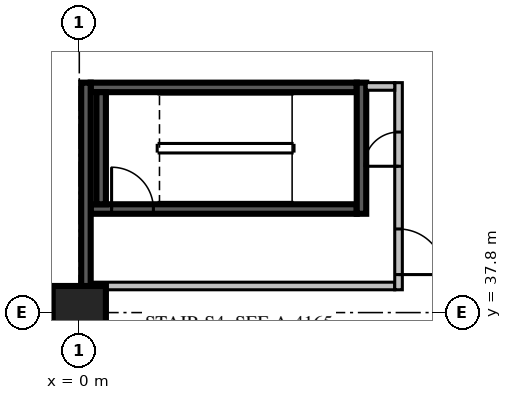
"""IFC4 building model, lengths in metres.
Left out: names, types, materials, properties, quantities, classifications, styles, units other than length and angle.
Written with IfcOpenShell. Run it as: python <this file> out.ifc"""

import sys

from ifc_helpers import new_model, si_unit, direction, frame, frame_2d, origin, origin_2d, place, context, subcontext, project, spatial, rectangle, extrude, source, transform, mapped, element, fill, save


model = new_model("IFC4")
c1 = context("Model", 3, precision=1e-05, world=origin(), true_north=direction((0.0, 1.0)))
c2 = subcontext(c1, "Body", "Model", "MODEL_VIEW")
j1 = project(units=[si_unit("LENGTHUNIT", "METRE"), si_unit("PLANEANGLEUNIT", "RADIAN")], contexts=[c1])
p1 = place(None, origin())
s1 = spatial("IfcSite", under=j1, at=p1, CompositionType="ELEMENT")
p2 = place(p1, origin())
s2 = spatial("IfcBuilding", under=s1, at=p2, CompositionType="ELEMENT")
p3 = place(p2, frame((0.0, 0.0, 7.5)))
s3 = spatial("IfcBuildingStorey", under=s2, at=p3, CompositionType="ELEMENT", Elevation=7.5)
m1 = source(origin(), c2, "Body", "SweptSolid", [
    extrude(rectangle(XDim=1.4, YDim=1.4, at=origin_2d()), origin(), (0.0, 0.0, 1.0), 5.4),
])
p4 = place(p3, frame((0.0, 37.8, 0.0), z_axis=(0.0, 0.0, 1.0), x_axis=(1.0, 0.0, 0.0)))
e1 = element("IfcColumn", 1, at=p4, inside=s3, PredefinedType="COLUMN", context=c2, shape_type="MappedRepresentation", body=[
    mapped(m1, transform((0.0, 0.0, 0.0), scale=1.0)),
])
m2 = source(origin(), c2, "Body", "SweptSolid", [
    extrude(rectangle(XDim=7.0, YDim=0.25, at=frame_2d((3.5, 0.0))), origin(), (0.0, 0.0, 1.0), 4.8),
])
p5 = place(p3, frame((0.3, 40.525, 0.0), z_axis=(0.0, 0.0, 1.0), x_axis=(1.0, 0.0, 0.0)))
e2 = element("IfcWall", 2, at=p5, inside=s3, PredefinedType="SOLIDWALL", context=c2, shape_type="MappedRepresentation", body=[
    mapped(m2, transform((0.0, 0.0, 0.0), scale=1.0)),
])
m3 = source(origin(), c2, "Body", "SweptSolid", [
    extrude(rectangle(XDim=1.1, YDim=2.1, at=frame_2d((0.55, 1.05))), frame((0.0, 0.135, 0.0), z_axis=(0.0, -1.0, 0.0), x_axis=(1.0, 0.0, 0.0)), (0.0, 0.0, 1.0), 0.27),
])
p6 = place(p5, frame((0.55, 0.0, 0.0)))
e3 = element("IfcOpeningElement", 3, at=p6, cuts=e2, PredefinedType="OPENING", context=c2, shape_type="MappedRepresentation", body=[
    mapped(m3, transform((0.0, 0.0, 0.0), scale=1.0)),
])
p7 = place(p3, frame((0.3, 43.725, 0.0), z_axis=(0.0, 0.0, 1.0), x_axis=(1.0, 0.0, 0.0)))
e4 = element("IfcWall", 4, at=p7, inside=s3, PredefinedType="SOLIDWALL", context=c2, shape_type="MappedRepresentation", body=[
    mapped(m2, transform((0.0, 0.0, 0.0), scale=1.0)),
])
m4 = source(origin(), c2, "Body", "SweptSolid", [
    extrude(rectangle(XDim=3.45, YDim=0.25, at=frame_2d((1.725, 0.0))), origin(), (0.0, 0.0, 1.0), 4.8),
])
p8 = place(p3, frame((7.425, 40.4, 0.0), z_axis=(0.0, 0.0, 1.0), x_axis=(0.0, 1.0, 0.0)))
e5 = element("IfcWall", 5, at=p8, inside=s3, PredefinedType="SOLIDWALL", context=c2, shape_type="MappedRepresentation", body=[
    mapped(m4, transform((0.0, 0.0, 0.0), scale=1.0)),
])
m5 = source(origin(), c2, "Body", "SweptSolid", [
    extrude(rectangle(XDim=2.95, YDim=0.25, at=frame_2d((1.475, 0.0))), origin(), (0.0, 0.0, 1.0), 4.8),
])
p9 = place(p3, frame((0.575, 40.65, 0.0), z_axis=(0.0, 0.0, 1.0), x_axis=(0.0, 1.0, 0.0)))
e6 = element("IfcWall", 6, at=p9, inside=s3, PredefinedType="SOLIDWALL", context=c2, shape_type="MappedRepresentation", body=[
    mapped(m5, transform((0.0, 0.0, 0.0), scale=1.0)),
])
m6 = source(origin(), c2, "Body", "SweptSolid", [
    extrude(rectangle(XDim=8.0, YDim=0.2, at=frame_2d((4.0, 0.0))), origin(), (0.0, 0.0, 1.0), 4.8),
])
p10 = place(p3, frame((0.3, 38.5, 0.0), z_axis=(0.0, 0.0, 1.0), x_axis=(1.0, 0.0, 0.0)))
e7 = element("IfcWall", 7, at=p10, inside=s3, PredefinedType="PARTITIONING", context=c2, shape_type="MappedRepresentation", body=[
    mapped(m6, transform((0.0, 0.0, 0.0), scale=1.0)),
])
m7 = source(origin(), c2, "Body", "SweptSolid", [
    extrude(rectangle(XDim=5.45, YDim=0.2, at=frame_2d((2.725, 0.0))), origin(), (0.0, 0.0, 1.0), 4.8),
])
p11 = place(p3, frame((8.4, 38.4, 0.0), z_axis=(0.0, 0.0, 1.0), x_axis=(0.0, 1.0, 0.0)))
e8 = element("IfcWall", 8, at=p11, inside=s3, PredefinedType="PARTITIONING", context=c2, shape_type="MappedRepresentation", body=[
    mapped(m7, transform((0.0, 0.0, 0.0), scale=1.0)),
])
m8 = source(origin(), c2, "Body", "SweptSolid", [
    extrude(rectangle(XDim=1.2, YDim=2.1, at=frame_2d((0.6, 1.05))), frame((0.0, 0.11, 0.0), z_axis=(0.0, -1.0, 0.0), x_axis=(1.0, 0.0, 0.0)), (0.0, 0.0, 1.0), 0.22),
])
p12 = place(p11, frame((0.4, 0.0, 0.0)))
e9 = element("IfcOpeningElement", 9, at=p12, cuts=e8, PredefinedType="OPENING", context=c2, shape_type="MappedRepresentation", body=[
    mapped(m8, transform((0.0, 0.0, 0.0), scale=1.0)),
])
m9 = source(origin(), c2, "Body", "SweptSolid", [
    extrude(rectangle(XDim=0.9, YDim=2.1, at=frame_2d((0.45, 1.05))), frame((0.0, 0.11, 0.0), z_axis=(0.0, -1.0, 0.0), x_axis=(1.0, 0.0, 0.0)), (0.0, 0.0, 1.0), 0.22),
])
p13 = place(p11, frame((3.25, 0.0, 0.0)))
e10 = element("IfcOpeningElement", 10, at=p13, cuts=e8, PredefinedType="OPENING", context=c2, shape_type="MappedRepresentation", body=[
    mapped(m9, transform((0.0, 0.0, 0.0), scale=1.0)),
])
m10 = source(origin(), c2, "Body", "SweptSolid", [
    extrude(rectangle(XDim=0.75, YDim=0.2, at=frame_2d((0.375, 0.0))), origin(), (0.0, 0.0, 1.0), 4.8),
])
p14 = place(p3, frame((7.55, 43.75, 0.0), z_axis=(0.0, 0.0, 1.0), x_axis=(1.0, 0.0, 0.0)))
e11 = element("IfcWall", 11, at=p14, inside=s3, PredefinedType="PARTITIONING", context=c2, shape_type="MappedRepresentation", body=[
    mapped(m10, transform((0.0, 0.0, 0.0), scale=1.0)),
])
m11 = source(origin(), c2, "Body", "SweptSolid", [
    extrude(rectangle(XDim=5.45, YDim=0.25, at=frame_2d((2.725, 0.0))), origin(), (0.0, 0.0, 1.0), 4.8),
])
p15 = place(p3, frame((0.175, 38.4, 0.0), z_axis=(0.0, 0.0, 1.0), x_axis=(0.0, 1.0, 0.0)))
e12 = element("IfcWall", 12, at=p15, inside=s3, PredefinedType="SOLIDWALL", context=c2, shape_type="MappedRepresentation", body=[
    mapped(m11, transform((0.0, 0.0, 0.0), scale=1.0)),
])
m12 = source(origin(), c2, "Body", "SweptSolid", [
    extrude(rectangle(XDim=1.1, YDim=2.1, at=frame_2d((0.55, 1.05))), frame((0.0, 0.025, 0.0), z_axis=(0.0, -1.0, 0.0), x_axis=(1.0, 0.0, 0.0)), (0.0, 0.0, 1.0), 0.05),
])
p16 = place(p6, origin())
e13 = element("IfcDoor", 13, at=p16, inside=s3, OperationType="SINGLE_SWING_LEFT", PredefinedType="DOOR", context=c2, shape_type="MappedRepresentation", body=[
    mapped(m12, transform((0.0, 0.0, 0.0), scale=1.0)),
])
fill(e3, e13)
m13 = source(origin(), c2, "Body", "SweptSolid", [
    extrude(rectangle(XDim=1.2, YDim=2.1, at=frame_2d((0.6, 1.05))), frame((0.0, 0.025, 0.0), z_axis=(0.0, -1.0, 0.0), x_axis=(1.0, 0.0, 0.0)), (0.0, 0.0, 1.0), 0.05),
])
p17 = place(p12, origin())
e14 = element("IfcDoor", 14, at=p17, inside=s3, OperationType="SINGLE_SWING_RIGHT", PredefinedType="DOOR", context=c2, shape_type="MappedRepresentation", body=[
    mapped(m13, transform((0.0, 0.0, 0.0), scale=1.0)),
])
fill(e9, e14)
m14 = source(origin(), c2, "Body", "SweptSolid", [
    extrude(rectangle(XDim=0.9, YDim=2.1, at=frame_2d((0.45, 1.05))), frame((0.0, 0.025, 0.0), z_axis=(0.0, -1.0, 0.0), x_axis=(1.0, 0.0, 0.0)), (0.0, 0.0, 1.0), 0.05),
])
p18 = place(p13, origin())
e15 = element("IfcDoor", 15, at=p18, inside=s3, OperationType="SINGLE_SWING_LEFT", PredefinedType="DOOR", context=c2, shape_type="MappedRepresentation", body=[
    mapped(m14, transform((0.0, 0.0, 0.0), scale=1.0)),
])
fill(e10, e15)
save(model, sys.argv[1])
